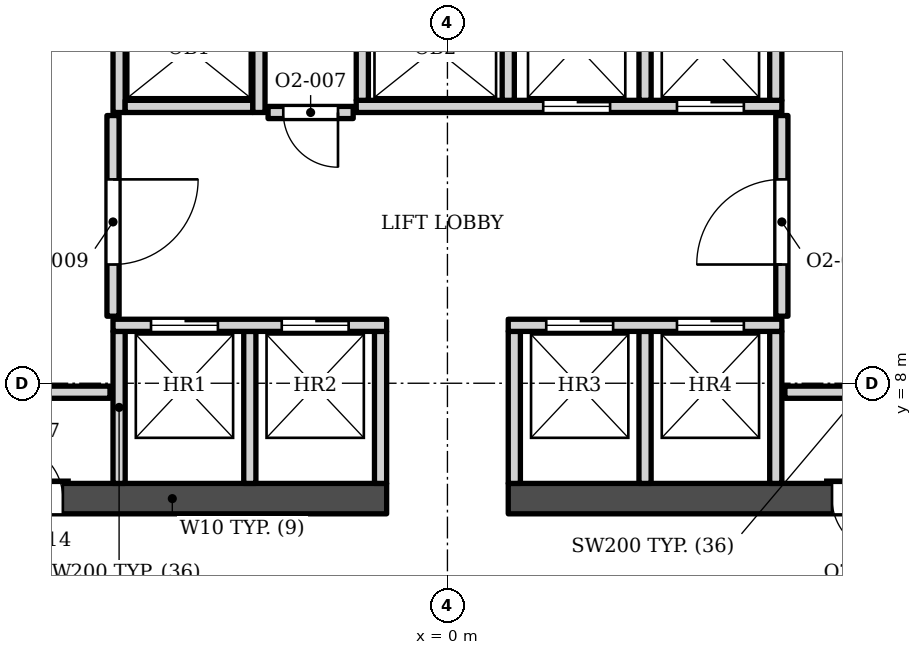
"""IFC4 building model, lengths in metres.
Left out: names, types, materials, properties, quantities, classifications, styles, units other than length and angle.
Written with IfcOpenShell. Run it as: python <this file> out.ifc"""

import sys

from ifc_helpers import new_model, si_unit, direction, frame, frame_2d, origin, place, context, subcontext, project, spatial, rectangle, extrude, element, fill, save


model = new_model("IFC4")
c1 = context("Model", 3, precision=1e-05, world=origin(), true_north=direction((0.0, 1.0)))
c2 = subcontext(c1, "Body", "Model", "MODEL_VIEW")
j1 = project(units=[si_unit("LENGTHUNIT", "METRE"), si_unit("PLANEANGLEUNIT", "RADIAN")], contexts=[c1])
p1 = place(None, origin())
s1 = spatial("IfcSite", under=j1, at=p1, CompositionType="ELEMENT")
p2 = place(p1, origin())
s2 = spatial("IfcBuilding", under=s1, at=p2, CompositionType="ELEMENT")
p3 = place(p2, frame((0.0, 0.0, 156.3)))
s3 = spatial("IfcBuildingStorey", under=s2, at=p3, CompositionType="ELEMENT", Elevation=156.3)
p4 = place(p3, frame((-8.05, 6.103, 0.0), z_axis=(0.0, 0.0, 1.0), x_axis=(1.0, 0.0, 0.0)))
e1 = element("IfcWall", 1, at=p4, inside=s3, PredefinedType="SHEAR", context=c2, shape_type="SweptSolid", body=[
    extrude(rectangle(XDim=7.05, YDim=0.5, at=frame_2d((3.525, 0.0))), origin(), (0.0, 0.0, 1.0), 3.9),
])
p5 = place(p4, frame((0.825, 0.0, 0.0)))
e2 = element("IfcOpeningElement", 2, at=p5, cuts=e1, PredefinedType="OPENING", context=c2, shape_type="SweptSolid", body=[
    extrude(rectangle(XDim=0.9, YDim=2.1, at=frame_2d((0.45, 1.05))), frame((0.0, 0.26, 0.0), z_axis=(0.0, -1.0, 0.0), x_axis=(1.0, 0.0, 0.0)), (0.0, 0.0, 1.0), 0.52),
])
p6 = place(p3, frame((1.0, 6.103, 0.0), z_axis=(0.0, 0.0, 1.0), x_axis=(1.0, 0.0, 0.0)))
e3 = element("IfcWall", 3, at=p6, inside=s3, PredefinedType="SHEAR", context=c2, shape_type="SweptSolid", body=[
    extrude(rectangle(XDim=7.05, YDim=0.5, at=frame_2d((3.525, 0.0))), origin(), (0.0, 0.0, 1.0), 3.9),
])
p7 = place(p6, frame((5.325, 0.0, 0.0)))
e4 = element("IfcOpeningElement", 4, at=p7, cuts=e3, PredefinedType="OPENING", context=c2, shape_type="SweptSolid", body=[
    extrude(rectangle(XDim=0.9, YDim=2.1, at=frame_2d((0.45, 1.05))), frame((0.0, 0.26, 0.0), z_axis=(0.0, -1.0, 0.0), x_axis=(1.0, 0.0, 0.0)), (0.0, 0.0, 1.0), 0.52),
])
for number, where, z_axis, x_axis in (
    (5, (-5.4, 6.353, 0.0), (0.0, 0.0, 1.0), (0.0, 1.0, 0.0)),
    (6, (-3.25, 6.353, 0.0), (0.0, 0.0, 1.0), (0.0, 1.0, 0.0)),
    (7, (-1.1, 6.353, 0.0), (0.0, 0.0, 1.0), (0.0, 1.0, 0.0)),
    (8, (1.1, 6.353, 0.0), (0.0, 0.0, 1.0), (0.0, 1.0, 0.0)),
    (9, (3.25, 6.353, 0.0), (0.0, 0.0, 1.0), (0.0, 1.0, 0.0)),
    (10, (5.4, 6.353, 0.0), (0.0, 0.0, 1.0), (0.0, 1.0, 0.0)),
    (11, (-8.05, 7.853, 0.0), (0.0, 0.0, 1.0), (1.0, 0.0, 0.0)),
    (12, (5.55, 7.853, 0.0), (0.0, 0.0, 1.0), (1.0, 0.0, 0.0)),
):
    element("IfcWall", number, at=place(p3, frame(where, z_axis=z_axis, x_axis=x_axis)), inside=s3, PredefinedType="SOLIDWALL", context=c2, shape_type="SweptSolid", body=[
        extrude(rectangle(XDim=2.5, YDim=0.2, at=frame_2d((1.25, 0.0))), origin(), (0.0, 0.0, 1.0), 3.73),
    ])
p8 = place(p3, frame((-5.5, 8.953, 0.0), z_axis=(0.0, 0.0, 1.0), x_axis=(1.0, 0.0, 0.0)))
e13 = element("IfcWall", 13, at=p8, inside=s3, PredefinedType="SOLIDWALL", context=c2, shape_type="SweptSolid", body=[
    extrude(rectangle(XDim=4.5, YDim=0.2, at=frame_2d((2.25, 0.0))), origin(), (0.0, 0.0, 1.0), 3.73),
])
p9 = place(p8, frame((0.625, 0.0, 0.0)))
e14 = element("IfcOpeningElement", 14, at=p9, cuts=e13, PredefinedType="OPENING", context=c2, shape_type="SweptSolid", body=[
    extrude(rectangle(XDim=1.1, YDim=2.1, at=frame_2d((0.55, 1.05))), frame((0.0, 0.11, 0.0), z_axis=(0.0, -1.0, 0.0), x_axis=(1.0, 0.0, 0.0)), (0.0, 0.0, 1.0), 0.22),
])
p10 = place(p8, frame((2.775, 0.0, 0.0)))
e15 = element("IfcOpeningElement", 15, at=p10, cuts=e13, PredefinedType="OPENING", context=c2, shape_type="SweptSolid", body=[
    extrude(rectangle(XDim=1.1, YDim=2.1, at=frame_2d((0.55, 1.05))), frame((0.0, 0.11, 0.0), z_axis=(0.0, -1.0, 0.0), x_axis=(1.0, 0.0, 0.0)), (0.0, 0.0, 1.0), 0.22),
])
p11 = place(p3, frame((1.0, 8.953, 0.0), z_axis=(0.0, 0.0, 1.0), x_axis=(1.0, 0.0, 0.0)))
e16 = element("IfcWall", 16, at=p11, inside=s3, PredefinedType="SOLIDWALL", context=c2, shape_type="SweptSolid", body=[
    extrude(rectangle(XDim=4.5, YDim=0.2, at=frame_2d((2.25, 0.0))), origin(), (0.0, 0.0, 1.0), 3.73),
])
p12 = place(p11, frame((0.625, 0.0, 0.0)))
e17 = element("IfcOpeningElement", 17, at=p12, cuts=e16, PredefinedType="OPENING", context=c2, shape_type="SweptSolid", body=[
    extrude(rectangle(XDim=1.1, YDim=2.1, at=frame_2d((0.55, 1.05))), frame((0.0, 0.11, 0.0), z_axis=(0.0, -1.0, 0.0), x_axis=(1.0, 0.0, 0.0)), (0.0, 0.0, 1.0), 0.22),
])
p13 = place(p11, frame((2.775, 0.0, 0.0)))
e18 = element("IfcOpeningElement", 18, at=p13, cuts=e16, PredefinedType="OPENING", context=c2, shape_type="SweptSolid", body=[
    extrude(rectangle(XDim=1.1, YDim=2.1, at=frame_2d((0.55, 1.05))), frame((0.0, 0.11, 0.0), z_axis=(0.0, -1.0, 0.0), x_axis=(1.0, 0.0, 0.0)), (0.0, 0.0, 1.0), 0.22),
])
p14 = place(p3, frame((-5.5, 9.103, 0.0), z_axis=(0.0, 0.0, 1.0), x_axis=(0.0, 1.0, 0.0)))
e19 = element("IfcWall", 19, at=p14, inside=s3, PredefinedType="SOLIDWALL", context=c2, shape_type="SweptSolid", body=[
    extrude(rectangle(XDim=3.3, YDim=0.2, at=frame_2d((1.65, 0.0))), origin(), (0.0, 0.0, 1.0), 3.73),
])
p15 = place(p14, frame((0.85, 0.0, 0.0)))
e20 = element("IfcOpeningElement", 20, at=p15, cuts=e19, PredefinedType="OPENING", context=c2, shape_type="SweptSolid", body=[
    extrude(rectangle(XDim=1.4, YDim=2.1, at=frame_2d((0.7, 1.05))), frame((0.0, 0.11, 0.0), z_axis=(0.0, -1.0, 0.0), x_axis=(1.0, 0.0, 0.0)), (0.0, 0.0, 1.0), 0.22),
])
p16 = place(p3, frame((5.5, 9.103, 0.0), z_axis=(0.0, 0.0, 1.0), x_axis=(0.0, 1.0, 0.0)))
e21 = element("IfcWall", 21, at=p16, inside=s3, PredefinedType="SOLIDWALL", context=c2, shape_type="SweptSolid", body=[
    extrude(rectangle(XDim=3.3, YDim=0.2, at=frame_2d((1.65, 0.0))), origin(), (0.0, 0.0, 1.0), 3.73),
])
p17 = place(p16, frame((0.85, 0.0, 0.0)))
e22 = element("IfcOpeningElement", 22, at=p17, cuts=e21, PredefinedType="OPENING", context=c2, shape_type="SweptSolid", body=[
    extrude(rectangle(XDim=1.4, YDim=2.1, at=frame_2d((0.7, 1.05))), frame((0.0, 0.11, 0.0), z_axis=(0.0, -1.0, 0.0), x_axis=(1.0, 0.0, 0.0)), (0.0, 0.0, 1.0), 0.22),
])
p18 = place(p3, frame((-2.95, 12.453, 0.0), z_axis=(0.0, 0.0, 1.0), x_axis=(1.0, 0.0, 0.0)))
e23 = element("IfcWall", 23, at=p18, inside=s3, PredefinedType="SOLIDWALL", context=c2, shape_type="SweptSolid", body=[
    extrude(rectangle(XDim=1.4, YDim=0.2, at=frame_2d((0.7, 0.0))), origin(), (0.0, 0.0, 1.0), 3.73),
])
p19 = place(p18, frame((0.25, 0.0, 0.0)))
e24 = element("IfcOpeningElement", 24, at=p19, cuts=e23, PredefinedType="OPENING", context=c2, shape_type="SweptSolid", body=[
    extrude(rectangle(XDim=0.9, YDim=2.1, at=frame_2d((0.45, 1.05))), frame((0.0, 0.11, 0.0), z_axis=(0.0, -1.0, 0.0), x_axis=(1.0, 0.0, 0.0)), (0.0, 0.0, 1.0), 0.22),
])
p20 = place(p3, frame((-5.4, 12.453, 0.0), z_axis=(0.0, 0.0, 1.0), x_axis=(0.0, 1.0, 0.0)))
e25 = element("IfcWall", 25, at=p20, inside=s3, PredefinedType="SOLIDWALL", context=c2, shape_type="SweptSolid", body=[
    extrude(rectangle(XDim=3.0, YDim=0.2, at=frame_2d((1.5, 0.0))), origin(), (0.0, 0.0, 1.0), 3.73),
])
p21 = place(p3, frame((-5.3, 12.552, 0.0), z_axis=(0.0, 0.0, 1.0), x_axis=(1.0, 0.0, 0.0)))
e26 = element("IfcWall", 26, at=p21, inside=s3, PredefinedType="SOLIDWALL", context=c2, shape_type="SweptSolid", body=[
    extrude(rectangle(XDim=2.1, YDim=0.2, at=frame_2d((1.05, 0.0))), origin(), (0.0, 0.0, 1.0), 3.73),
])
p22 = place(p3, frame((-3.1, 12.453, 0.0), z_axis=(0.0, 0.0, 1.0), x_axis=(0.0, 1.0, 0.0)))
e27 = element("IfcWall", 27, at=p22, inside=s3, PredefinedType="SOLIDWALL", context=c2, shape_type="SweptSolid", body=[
    extrude(rectangle(XDim=3.0, YDim=0.2, at=frame_2d((1.5, 0.0))), origin(), (0.0, 0.0, 1.0), 3.73),
])
p23 = place(p3, frame((-1.5, 12.552, 0.0), z_axis=(0.0, 0.0, 1.0), x_axis=(1.0, 0.0, 0.0)))
e28 = element("IfcWall", 28, at=p23, inside=s3, PredefinedType="SOLIDWALL", context=c2, shape_type="SweptSolid", body=[
    extrude(rectangle(XDim=7.0, YDim=0.2, at=frame_2d((3.5, 0.0))), origin(), (0.0, 0.0, 1.0), 3.73),
])
p24 = place(p23, frame((3.075, 0.0, 0.0)))
e29 = element("IfcOpeningElement", 29, at=p24, cuts=e28, PredefinedType="OPENING", context=c2, shape_type="SweptSolid", body=[
    extrude(rectangle(XDim=1.1, YDim=2.1, at=frame_2d((0.55, 1.05))), frame((0.0, 0.11, 0.0), z_axis=(0.0, -1.0, 0.0), x_axis=(1.0, 0.0, 0.0)), (0.0, 0.0, 1.0), 0.22),
])
p25 = place(p23, frame((5.275, 0.0, 0.0)))
e30 = element("IfcOpeningElement", 30, at=p25, cuts=e28, PredefinedType="OPENING", context=c2, shape_type="SweptSolid", body=[
    extrude(rectangle(XDim=1.1, YDim=2.1, at=frame_2d((0.55, 1.05))), frame((0.0, 0.11, 0.0), z_axis=(0.0, -1.0, 0.0), x_axis=(1.0, 0.0, 0.0)), (0.0, 0.0, 1.0), 0.22),
])
for number, where, z_axis, x_axis in (
    (31, (-1.4, 12.653, 0.0), (0.0, 0.0, 1.0), (0.0, 1.0, 0.0)),
    (32, (1.0, 12.653, 0.0), (0.0, 0.0, 1.0), (0.0, 1.0, 0.0)),
    (33, (3.25, 12.653, 0.0), (0.0, 0.0, 1.0), (0.0, 1.0, 0.0)),
):
    element("IfcWall", number, at=place(p3, frame(where, z_axis=z_axis, x_axis=x_axis)), inside=s3, PredefinedType="SOLIDWALL", context=c2, shape_type="SweptSolid", body=[
        extrude(rectangle(XDim=2.6, YDim=0.2, at=frame_2d((1.3, 0.0))), origin(), (0.0, 0.0, 1.0), 3.73),
    ])
p26 = place(p3, frame((5.4, 12.653, 0.0), z_axis=(0.0, 0.0, 1.0), x_axis=(0.0, 1.0, 0.0)))
e34 = element("IfcWall", 34, at=p26, inside=s3, PredefinedType="SOLIDWALL", context=c2, shape_type="SweptSolid", body=[
    extrude(rectangle(XDim=1.6, YDim=0.2, at=frame_2d((0.8, 0.0))), origin(), (0.0, 0.0, 1.0), 3.73),
])
p27 = place(p9, origin())
e35 = element("IfcDoor", 35, at=p27, inside=s3, OperationType="DOUBLE_DOOR_SLIDING", PredefinedType="DOOR", context=c2, shape_type="SweptSolid", body=[
    extrude(rectangle(XDim=1.1, YDim=2.1, at=frame_2d((0.55, 1.05))), frame((0.0, 0.025, 0.0), z_axis=(0.0, -1.0, 0.0), x_axis=(1.0, 0.0, 0.0)), (0.0, 0.0, 1.0), 0.05),
])
fill(e14, e35)
p28 = place(p10, origin())
e36 = element("IfcDoor", 36, at=p28, inside=s3, OperationType="DOUBLE_DOOR_SLIDING", PredefinedType="DOOR", context=c2, shape_type="SweptSolid", body=[
    extrude(rectangle(XDim=1.1, YDim=2.1, at=frame_2d((0.55, 1.05))), frame((0.0, 0.025, 0.0), z_axis=(0.0, -1.0, 0.0), x_axis=(1.0, 0.0, 0.0)), (0.0, 0.0, 1.0), 0.05),
])
fill(e15, e36)
p29 = place(p12, origin())
e37 = element("IfcDoor", 37, at=p29, inside=s3, OperationType="DOUBLE_DOOR_SLIDING", PredefinedType="DOOR", context=c2, shape_type="SweptSolid", body=[
    extrude(rectangle(XDim=1.1, YDim=2.1, at=frame_2d((0.55, 1.05))), frame((0.0, 0.025, 0.0), z_axis=(0.0, -1.0, 0.0), x_axis=(1.0, 0.0, 0.0)), (0.0, 0.0, 1.0), 0.05),
])
fill(e17, e37)
p30 = place(p13, origin())
e38 = element("IfcDoor", 38, at=p30, inside=s3, OperationType="DOUBLE_DOOR_SLIDING", PredefinedType="DOOR", context=c2, shape_type="SweptSolid", body=[
    extrude(rectangle(XDim=1.1, YDim=2.1, at=frame_2d((0.55, 1.05))), frame((0.0, 0.025, 0.0), z_axis=(0.0, -1.0, 0.0), x_axis=(1.0, 0.0, 0.0)), (0.0, 0.0, 1.0), 0.05),
])
fill(e18, e38)
p31 = place(p24, origin())
e39 = element("IfcDoor", 39, at=p31, inside=s3, OperationType="DOUBLE_DOOR_SLIDING", PredefinedType="DOOR", context=c2, shape_type="SweptSolid", body=[
    extrude(rectangle(XDim=1.1, YDim=2.1, at=frame_2d((0.55, 1.05))), frame((0.0, 0.025, 0.0), z_axis=(0.0, -1.0, 0.0), x_axis=(1.0, 0.0, 0.0)), (0.0, 0.0, 1.0), 0.05),
])
fill(e29, e39)
p32 = place(p25, origin())
e40 = element("IfcDoor", 40, at=p32, inside=s3, OperationType="DOUBLE_DOOR_SLIDING", PredefinedType="DOOR", context=c2, shape_type="SweptSolid", body=[
    extrude(rectangle(XDim=1.1, YDim=2.1, at=frame_2d((0.55, 1.05))), frame((0.0, 0.025, 0.0), z_axis=(0.0, -1.0, 0.0), x_axis=(1.0, 0.0, 0.0)), (0.0, 0.0, 1.0), 0.05),
])
fill(e30, e40)
p33 = place(p19, origin())
e41 = element("IfcDoor", 41, at=p33, inside=s3, OperationType="SINGLE_SWING_RIGHT", PredefinedType="DOOR", context=c2, shape_type="SweptSolid", body=[
    extrude(rectangle(XDim=0.9, YDim=2.1, at=frame_2d((0.45, 1.05))), frame((0.0, 0.025, 0.0), z_axis=(0.0, -1.0, 0.0), x_axis=(1.0, 0.0, 0.0)), (0.0, 0.0, 1.0), 0.05),
])
fill(e24, e41)
p34 = place(p15, origin())
e42 = element("IfcDoor", 42, at=p34, inside=s3, OperationType="SINGLE_SWING_RIGHT", PredefinedType="DOOR", context=c2, shape_type="SweptSolid", body=[
    extrude(rectangle(XDim=1.4, YDim=2.1, at=frame_2d((0.7, 1.05))), frame((0.0, 0.025, 0.0), z_axis=(0.0, -1.0, 0.0), x_axis=(1.0, 0.0, 0.0)), (0.0, 0.0, 1.0), 0.05),
])
fill(e20, e42)
p35 = place(p17, origin())
e43 = element("IfcDoor", 43, at=p35, inside=s3, OperationType="SINGLE_SWING_LEFT", PredefinedType="DOOR", context=c2, shape_type="SweptSolid", body=[
    extrude(rectangle(XDim=1.4, YDim=2.1, at=frame_2d((0.7, 1.05))), frame((0.0, 0.025, 0.0), z_axis=(0.0, -1.0, 0.0), x_axis=(1.0, 0.0, 0.0)), (0.0, 0.0, 1.0), 0.05),
])
fill(e22, e43)
p36 = place(p5, origin())
e44 = element("IfcDoor", 44, at=p36, inside=s3, OperationType="SINGLE_SWING_LEFT", PredefinedType="DOOR", context=c2, shape_type="SweptSolid", body=[
    extrude(rectangle(XDim=0.9, YDim=2.1, at=frame_2d((0.45, 1.05))), frame((0.0, 0.025, 0.0), z_axis=(0.0, -1.0, 0.0), x_axis=(1.0, 0.0, 0.0)), (0.0, 0.0, 1.0), 0.05),
])
fill(e2, e44)
p37 = place(p7, origin())
e45 = element("IfcDoor", 45, at=p37, inside=s3, OperationType="SINGLE_SWING_RIGHT", PredefinedType="DOOR", context=c2, shape_type="SweptSolid", body=[
    extrude(rectangle(XDim=0.9, YDim=2.1, at=frame_2d((0.45, 1.05))), frame((0.0, 0.025, 0.0), z_axis=(0.0, -1.0, 0.0), x_axis=(1.0, 0.0, 0.0)), (0.0, 0.0, 1.0), 0.05),
])
fill(e4, e45)
save(model, sys.argv[1])
